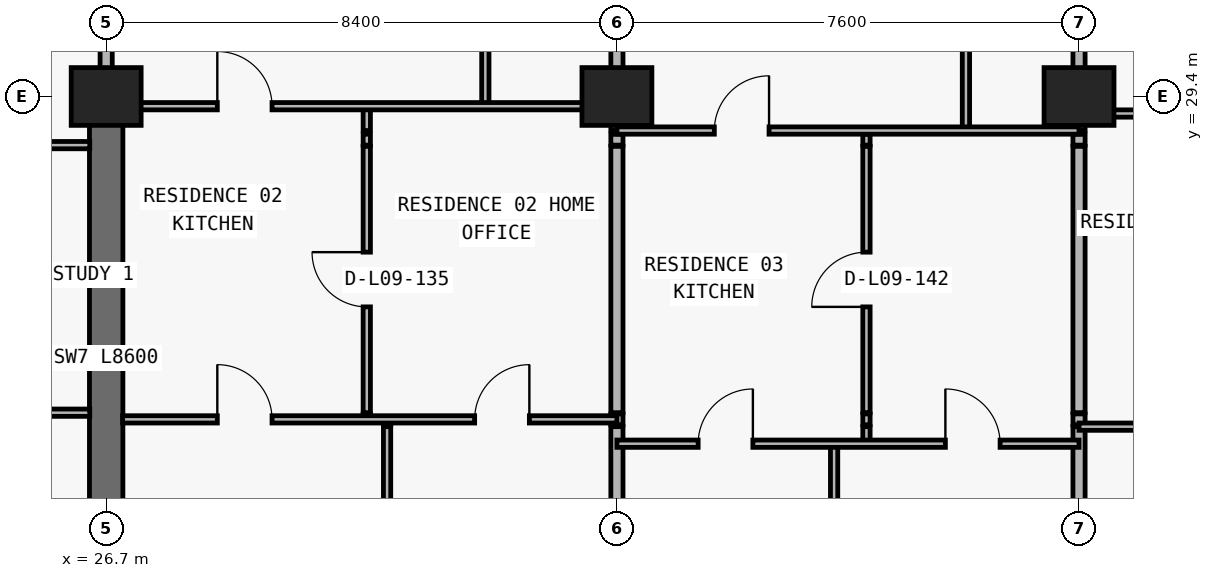
"""IFC4 building model, lengths in metres.
Left out: names, types, materials, properties, quantities, classifications, styles, units other than length and angle.
Written with IfcOpenShell. Run it as: python <this file> out.ifc"""

import sys

from ifc_helpers import new_model, si_unit, direction, frame, frame_2d, origin, origin_2d, place, context, subcontext, project, spatial, rectangle, extrude, element, fill, save


model = new_model("IFC4")
c1 = context("Model", 3, precision=1e-05, world=origin(), true_north=direction((0.0, 1.0)))
c2 = subcontext(c1, "Body", "Model", "MODEL_VIEW")
j1 = project(units=[si_unit("LENGTHUNIT", "METRE"), si_unit("PLANEANGLEUNIT", "RADIAN")], contexts=[c1])
p1 = place(None, origin())
s1 = spatial("IfcSite", under=j1, at=p1, CompositionType="ELEMENT")
p2 = place(p1, origin())
s2 = spatial("IfcBuilding", under=s1, at=p2, CompositionType="ELEMENT")
p3 = place(p2, frame((0.0, 0.0, 39.9)))
s3 = spatial("IfcBuildingStorey", under=s2, at=p3, CompositionType="ELEMENT", Elevation=39.9)
for number, where, z_axis, x_axis in (
    (1, (26.7, 29.4, 0.0), (0.0, 0.0, 1.0), (1.0, 0.0, 0.0)),
    (2, (35.1, 29.4, 0.0), (0.0, 0.0, 1.0), (1.0, 0.0, 0.0)),
    (3, (42.7, 29.4, 0.0), (0.0, 0.0, 1.0), (1.0, 0.0, 0.0)),
):
    element("IfcColumn", number, at=place(p3, frame(where, z_axis=z_axis, x_axis=x_axis)), inside=s3, PredefinedType="COLUMN", context=c2, shape_type="SweptSolid", body=[
        extrude(rectangle(XDim=1.15, YDim=0.95, at=origin_2d()), origin(), (0.0, 0.0, 1.0), 3.05),
    ])
p4 = place(p3, frame((26.7, 20.8, 0.0), z_axis=(0.0, 0.0, 1.0), x_axis=(0.0, 1.0, 0.0)))
e4 = element("IfcWall", 4, at=p4, inside=s3, PredefinedType="SHEAR", context=c2, shape_type="SweptSolid", body=[
    extrude(rectangle(XDim=8.6, YDim=0.55, at=frame_2d((4.3, 0.0))), origin(), (0.0, 0.0, 1.0), 3.05),
])
p5 = place(p3, frame((26.7, 29.405, 0.0), z_axis=(0.0, 0.0, 1.0), x_axis=(0.0, 1.0, 0.0)))
e5 = element("IfcWall", 5, at=p5, inside=s3, PredefinedType="PARTITIONING", context=c2, shape_type="SweptSolid", body=[
    extrude(rectangle(XDim=4.595, YDim=0.2, at=frame_2d((2.297, 0.0))), origin(), (0.0, 0.0, 1.0), 2.335),
])
p6 = place(p3, frame((30.986, 24.09, 0.0), z_axis=(0.0, 0.0, 1.0), x_axis=(0.0, 1.0, 0.0)))
e6 = element("IfcWall", 6, at=p6, inside=s3, PredefinedType="PARTITIONING", context=c2, shape_type="SweptSolid", body=[
    extrude(rectangle(XDim=0.09, YDim=0.12, at=frame_2d((0.045, 0.0))), origin(), (0.0, 0.0, 1.0), 2.423),
])
p7 = place(p3, frame((30.986, 24.2, 0.0), z_axis=(0.0, 0.0, 1.0), x_axis=(0.0, 1.0, 0.0)))
e7 = element("IfcWall", 7, at=p7, inside=s3, PredefinedType="PARTITIONING", context=c2, shape_type="SweptSolid", body=[
    extrude(rectangle(XDim=4.38, YDim=0.12, at=frame_2d((2.19, 0.0))), origin(), (0.0, 0.0, 1.0), 2.423),
])
p8 = place(p7, frame((1.74, 0.0, 0.0)))
e8 = element("IfcOpeningElement", 8, at=p8, cuts=e7, PredefinedType="OPENING", context=c2, shape_type="SweptSolid", body=[
    extrude(rectangle(XDim=0.9, YDim=2.15, at=frame_2d((0.45, 1.075))), frame((0.0, 0.07, 0.0), z_axis=(0.0, -1.0, 0.0), x_axis=(1.0, 0.0, 0.0)), (0.0, 0.0, 1.0), 0.14),
])
p9 = place(p3, frame((30.986, 28.6, 0.0), z_axis=(0.0, 0.0, 1.0), x_axis=(0.0, 1.0, 0.0)))
e9 = element("IfcWall", 9, at=p9, inside=s3, PredefinedType="PARTITIONING", context=c2, shape_type="SweptSolid", body=[
    extrude(rectangle(XDim=0.18, YDim=0.12, at=frame_2d((0.09, 0.0))), origin(), (0.0, 0.0, 1.0), 2.423),
])
p10 = place(p3, frame((30.986, 28.84, 0.0), z_axis=(0.0, 0.0, 1.0), x_axis=(0.0, 1.0, 0.0)))
e10 = element("IfcWall", 10, at=p10, inside=s3, PredefinedType="PARTITIONING", context=c2, shape_type="SweptSolid", body=[
    extrude(rectangle(XDim=0.4, YDim=0.12, at=frame_2d((0.2, 0.0))), origin(), (0.0, 0.0, 1.0), 2.423),
])
p11 = place(p3, frame((31.32, 6.24, 0.0), z_axis=(0.0, 0.0, 1.0), x_axis=(0.0, 1.0, 0.0)))
e11 = element("IfcWall", 11, at=p11, inside=s3, PredefinedType="PARTITIONING", context=c2, shape_type="SweptSolid", body=[
    extrude(rectangle(XDim=17.73, YDim=0.12, at=frame_2d((8.865, 0.0))), origin(), (0.0, 0.0, 1.0), 3.05),
])
p12 = place(p3, frame((31.32, 24.0, 0.0), z_axis=(0.0, 0.0, 1.0), x_axis=(0.0, 1.0, 0.0)))
e12 = element("IfcWall", 12, at=p12, inside=s3, PredefinedType="PARTITIONING", context=c2, shape_type="SweptSolid", body=[
    extrude(rectangle(XDim=0.09, YDim=0.12, at=frame_2d((0.045, 0.0))), origin(), (0.0, 0.0, 1.0), 3.05),
])
p13 = place(p3, frame((32.936, 29.24, 0.0), z_axis=(0.0, 0.0, 1.0), x_axis=(0.0, 1.0, 0.0)))
e13 = element("IfcWall", 13, at=p13, inside=s3, PredefinedType="PARTITIONING", context=c2, shape_type="SweptSolid", body=[
    extrude(rectangle(XDim=4.76, YDim=0.12, at=frame_2d((2.38, 0.0))), origin(), (0.0, 0.0, 1.0), 3.05),
])
p14 = place(p13, frame((1.955, 0.0, 0.0)))
e14 = element("IfcOpeningElement", 14, at=p14, cuts=e13, PredefinedType="OPENING", context=c2, shape_type="SweptSolid", body=[
    extrude(rectangle(XDim=0.85, YDim=2.1, at=frame_2d((0.425, 1.05))), frame((0.0, 0.07, 0.0), z_axis=(0.0, -1.0, 0.0), x_axis=(1.0, 0.0, 0.0)), (0.0, 0.0, 1.0), 0.14),
])
p15 = place(p3, frame((35.1, 6.24, 0.0), z_axis=(0.0, 0.0, 1.0), x_axis=(0.0, 1.0, 0.0)))
e15 = element("IfcWall", 15, at=p15, inside=s3, PredefinedType="PARTITIONING", context=c2, shape_type="SweptSolid", body=[
    extrude(rectangle(XDim=17.73, YDim=0.2, at=frame_2d((8.865, 0.0))), origin(), (0.0, 0.0, 1.0), 2.11),
])
p16 = place(p3, frame((35.1, 24.0, 0.0), z_axis=(0.0, 0.0, 1.0), x_axis=(0.0, 1.0, 0.0)))
e16 = element("IfcWall", 16, at=p16, inside=s3, PredefinedType="PARTITIONING", context=c2, shape_type="SweptSolid", body=[
    extrude(rectangle(XDim=0.18, YDim=0.2, at=frame_2d((0.09, 0.0))), origin(), (0.0, 0.0, 1.0), 2.11),
])
p17 = place(p3, frame((35.1, 24.2, 0.0), z_axis=(0.0, 0.0, 1.0), x_axis=(0.0, 1.0, 0.0)))
e17 = element("IfcWall", 17, at=p17, inside=s3, PredefinedType="PARTITIONING", context=c2, shape_type="SweptSolid", body=[
    extrude(rectangle(XDim=4.38, YDim=0.2, at=frame_2d((2.19, 0.0))), origin(), (0.0, 0.0, 1.0), 2.11),
])
p18 = place(p3, frame((35.1, 28.6, 0.0), z_axis=(0.0, 0.0, 1.0), x_axis=(0.0, 1.0, 0.0)))
e18 = element("IfcWall", 18, at=p18, inside=s3, PredefinedType="PARTITIONING", context=c2, shape_type="SweptSolid", body=[
    extrude(rectangle(XDim=0.18, YDim=0.2, at=frame_2d((0.09, 0.0))), origin(), (0.0, 0.0, 1.0), 2.11),
])
p19 = place(p3, frame((35.1, 28.84, 0.0), z_axis=(0.0, 0.0, 1.0), x_axis=(0.0, 1.0, 0.0)))
e19 = element("IfcWall", 19, at=p19, inside=s3, PredefinedType="PARTITIONING", context=c2, shape_type="SweptSolid", body=[
    extrude(rectangle(XDim=5.16, YDim=0.2, at=frame_2d((2.58, 0.0))), origin(), (0.0, 0.0, 1.0), 2.11),
])
p20 = place(p3, frame((38.672, 6.24, 0.0), z_axis=(0.0, 0.0, 1.0), x_axis=(0.0, 1.0, 0.0)))
e20 = element("IfcWall", 20, at=p20, inside=s3, PredefinedType="PARTITIONING", context=c2, shape_type="SweptSolid", body=[
    extrude(rectangle(XDim=17.45, YDim=0.12, at=frame_2d((8.725, 0.0))), origin(), (0.0, 0.0, 1.0), 2.423),
])
p21 = place(p3, frame((39.204, 23.69, 0.0), z_axis=(0.0, 0.0, 1.0), x_axis=(0.0, 1.0, 0.0)))
e21 = element("IfcWall", 21, at=p21, inside=s3, PredefinedType="PARTITIONING", context=c2, shape_type="SweptSolid", body=[
    extrude(rectangle(XDim=0.28, YDim=0.12, at=frame_2d((0.14, 0.0))), origin(), (0.0, 0.0, 1.0), 3.05),
])
p22 = place(p3, frame((39.204, 24.0, 0.0), z_axis=(0.0, 0.0, 1.0), x_axis=(0.0, 1.0, 0.0)))
e22 = element("IfcWall", 22, at=p22, inside=s3, PredefinedType="PARTITIONING", context=c2, shape_type="SweptSolid", body=[
    extrude(rectangle(XDim=0.18, YDim=0.12, at=frame_2d((0.09, 0.0))), origin(), (0.0, 0.0, 1.0), 3.05),
])
p23 = place(p3, frame((39.204, 24.2, 0.0), z_axis=(0.0, 0.0, 1.0), x_axis=(0.0, 1.0, 0.0)))
e23 = element("IfcWall", 23, at=p23, inside=s3, PredefinedType="PARTITIONING", context=c2, shape_type="SweptSolid", body=[
    extrude(rectangle(XDim=4.38, YDim=0.12, at=frame_2d((2.19, 0.0))), origin(), (0.0, 0.0, 1.0), 3.05),
])
p24 = place(p23, frame((1.74, 0.0, 0.0)))
e24 = element("IfcOpeningElement", 24, at=p24, cuts=e23, PredefinedType="OPENING", context=c2, shape_type="SweptSolid", body=[
    extrude(rectangle(XDim=0.9, YDim=2.15, at=frame_2d((0.45, 1.075))), frame((0.0, 0.07, 0.0), z_axis=(0.0, -1.0, 0.0), x_axis=(1.0, 0.0, 0.0)), (0.0, 0.0, 1.0), 0.14),
])
p25 = place(p3, frame((39.204, 28.6, 0.0), z_axis=(0.0, 0.0, 1.0), x_axis=(0.0, 1.0, 0.0)))
e25 = element("IfcWall", 25, at=p25, inside=s3, PredefinedType="PARTITIONING", context=c2, shape_type="SweptSolid", body=[
    extrude(rectangle(XDim=0.18, YDim=0.12, at=frame_2d((0.09, 0.0))), origin(), (0.0, 0.0, 1.0), 3.05),
])
p26 = place(p3, frame((40.84, 28.84, 0.0), z_axis=(0.0, 0.0, 1.0), x_axis=(0.0, 1.0, 0.0)))
e26 = element("IfcWall", 26, at=p26, inside=s3, PredefinedType="PARTITIONING", context=c2, shape_type="SweptSolid", body=[
    extrude(rectangle(XDim=5.16, YDim=0.12, at=frame_2d((2.58, 0.0))), origin(), (0.0, 0.0, 1.0), 2.578),
])
p27 = place(p26, frame((2.155, 0.0, 0.0)))
e27 = element("IfcOpeningElement", 27, at=p27, cuts=e26, PredefinedType="OPENING", context=c2, shape_type="SweptSolid", body=[
    extrude(rectangle(XDim=0.85, YDim=2.1, at=frame_2d((0.425, 1.05))), frame((0.0, 0.07, 0.0), z_axis=(0.0, -1.0, 0.0), x_axis=(1.0, 0.0, 0.0)), (0.0, 0.0, 1.0), 0.14),
])
p28 = place(p3, frame((42.7, 6.24, 0.0), z_axis=(0.0, 0.0, 1.0), x_axis=(0.0, 1.0, 0.0)))
e28 = element("IfcWall", 28, at=p28, inside=s3, PredefinedType="PARTITIONING", context=c2, shape_type="SweptSolid", body=[
    extrude(rectangle(XDim=17.73, YDim=0.2, at=frame_2d((8.865, 0.0))), origin(), (0.0, 0.0, 1.0), 2.11),
])
p29 = place(p3, frame((42.7, 24.0, 0.0), z_axis=(0.0, 0.0, 1.0), x_axis=(0.0, 1.0, 0.0)))
e29 = element("IfcWall", 29, at=p29, inside=s3, PredefinedType="PARTITIONING", context=c2, shape_type="SweptSolid", body=[
    extrude(rectangle(XDim=0.18, YDim=0.2, at=frame_2d((0.09, 0.0))), origin(), (0.0, 0.0, 1.0), 2.11),
])
p30 = place(p3, frame((42.7, 24.2, 0.0), z_axis=(0.0, 0.0, 1.0), x_axis=(0.0, 1.0, 0.0)))
e30 = element("IfcWall", 30, at=p30, inside=s3, PredefinedType="PARTITIONING", context=c2, shape_type="SweptSolid", body=[
    extrude(rectangle(XDim=4.38, YDim=0.2, at=frame_2d((2.19, 0.0))), origin(), (0.0, 0.0, 1.0), 2.11),
])
p31 = place(p3, frame((42.7, 28.6, 0.0), z_axis=(0.0, 0.0, 1.0), x_axis=(0.0, 1.0, 0.0)))
e31 = element("IfcWall", 31, at=p31, inside=s3, PredefinedType="PARTITIONING", context=c2, shape_type="SweptSolid", body=[
    extrude(rectangle(XDim=0.18, YDim=0.2, at=frame_2d((0.09, 0.0))), origin(), (0.0, 0.0, 1.0), 2.11),
])
p32 = place(p3, frame((42.7, 28.84, 0.0), z_axis=(0.0, 0.0, 1.0), x_axis=(0.0, 1.0, 0.0)))
e32 = element("IfcWall", 32, at=p32, inside=s3, PredefinedType="PARTITIONING", context=c2, shape_type="SweptSolid", body=[
    extrude(rectangle(XDim=5.16, YDim=0.2, at=frame_2d((2.58, 0.0))), origin(), (0.0, 0.0, 1.0), 2.11),
])
p33 = place(p3, frame((35.1, 23.69, 0.0), z_axis=(0.0, 0.0, 1.0), x_axis=(1.0, 0.0, 0.0)))
e33 = element("IfcWall", 33, at=p33, inside=s3, PredefinedType="PARTITIONING", context=c2, shape_type="SweptSolid", body=[
    extrude(rectangle(XDim=7.6, YDim=0.12, at=frame_2d((3.8, 0.0))), origin(), (0.0, 0.0, 1.0), 3.05),
])
p34 = place(p33, frame((1.336, 0.0, 0.0)))
e34 = element("IfcOpeningElement", 34, at=p34, cuts=e33, PredefinedType="OPENING", context=c2, shape_type="SweptSolid", body=[
    extrude(rectangle(XDim=0.9, YDim=2.15, at=frame_2d((0.45, 1.075))), frame((0.0, 0.07, 0.0), z_axis=(0.0, -1.0, 0.0), x_axis=(1.0, 0.0, 0.0)), (0.0, 0.0, 1.0), 0.14),
])
p35 = place(p33, frame((5.402, 0.0, 0.0)))
e35 = element("IfcOpeningElement", 35, at=p35, cuts=e33, PredefinedType="OPENING", context=c2, shape_type="SweptSolid", body=[
    extrude(rectangle(XDim=0.9, YDim=2.15, at=frame_2d((0.45, 1.075))), frame((0.0, 0.07, 0.0), z_axis=(0.0, -1.0, 0.0), x_axis=(1.0, 0.0, 0.0)), (0.0, 0.0, 1.0), 0.14),
])
p36 = place(p3, frame((42.7, 23.97, 0.0), z_axis=(0.0, 0.0, 1.0), x_axis=(1.0, 0.0, 0.0)))
e36 = element("IfcWall", 36, at=p36, inside=s3, PredefinedType="PARTITIONING", context=c2, shape_type="SweptSolid", body=[
    extrude(rectangle(XDim=8.13, YDim=0.12, at=frame_2d((4.065, 0.0))), origin(), (0.0, 0.0, 1.0), 3.05),
])
p37 = place(p36, frame((1.86, 0.0, 0.0)))
e37 = element("IfcOpeningElement", 37, at=p37, cuts=e36, PredefinedType="OPENING", context=c2, shape_type="SweptSolid", body=[
    extrude(rectangle(XDim=0.9, YDim=2.15, at=frame_2d((0.45, 1.075))), frame((0.0, 0.07, 0.0), z_axis=(0.0, -1.0, 0.0), x_axis=(1.0, 0.0, 0.0)), (0.0, 0.0, 1.0), 0.14),
])
p38 = place(p36, frame((6.008, 0.0, 0.0)))
e38 = element("IfcOpeningElement", 38, at=p38, cuts=e36, PredefinedType="OPENING", context=c2, shape_type="SweptSolid", body=[
    extrude(rectangle(XDim=0.9, YDim=2.15, at=frame_2d((0.45, 1.075))), frame((0.0, 0.07, 0.0), z_axis=(0.0, -1.0, 0.0), x_axis=(1.0, 0.0, 0.0)), (0.0, 0.0, 1.0), 0.14),
])
p39 = place(p3, frame((26.97, 24.09, 0.0), z_axis=(0.0, 0.0, 1.0), x_axis=(1.0, 0.0, 0.0)))
e39 = element("IfcWall", 39, at=p39, inside=s3, PredefinedType="PARTITIONING", context=c2, shape_type="SweptSolid", body=[
    extrude(rectangle(XDim=8.13, YDim=0.12, at=frame_2d((4.065, 0.0))), origin(), (0.0, 0.0, 1.0), 3.05),
])
p40 = place(p39, frame((1.558, 0.0, 0.0)))
e40 = element("IfcOpeningElement", 40, at=p40, cuts=e39, PredefinedType="OPENING", context=c2, shape_type="SweptSolid", body=[
    extrude(rectangle(XDim=0.9, YDim=2.15, at=frame_2d((0.45, 1.075))), frame((0.0, 0.07, 0.0), z_axis=(0.0, -1.0, 0.0), x_axis=(1.0, 0.0, 0.0)), (0.0, 0.0, 1.0), 0.14),
])
p41 = place(p39, frame((5.79, 0.0, 0.0)))
e41 = element("IfcOpeningElement", 41, at=p41, cuts=e39, PredefinedType="OPENING", context=c2, shape_type="SweptSolid", body=[
    extrude(rectangle(XDim=0.9, YDim=2.15, at=frame_2d((0.45, 1.075))), frame((0.0, 0.07, 0.0), z_axis=(0.0, -1.0, 0.0), x_axis=(1.0, 0.0, 0.0)), (0.0, 0.0, 1.0), 0.14),
])
p42 = place(p3, frame((18.305, 24.2, 0.0), z_axis=(0.0, 0.0, 1.0), x_axis=(1.0, 0.0, 0.0)))
e42 = element("IfcWall", 42, at=p42, inside=s3, PredefinedType="PARTITIONING", context=c2, shape_type="SweptSolid", body=[
    extrude(rectangle(XDim=8.125, YDim=0.12, at=frame_2d((4.062, 0.0))), origin(), (0.0, 0.0, 1.0), 3.05),
])
p43 = place(p42, frame((3.613, 0.0, 0.0)))
e43 = element("IfcOpeningElement", 43, at=p43, cuts=e42, PredefinedType="OPENING", context=c2, shape_type="SweptSolid", body=[
    extrude(rectangle(XDim=0.9, YDim=2.15, at=frame_2d((0.45, 1.075))), frame((0.0, 0.07, 0.0), z_axis=(0.0, -1.0, 0.0), x_axis=(1.0, 0.0, 0.0)), (0.0, 0.0, 1.0), 0.14),
])
p44 = place(p3, frame((18.3, 28.6, 0.0), z_axis=(0.0, 0.0, 1.0), x_axis=(1.0, 0.0, 0.0)))
e44 = element("IfcWall", 44, at=p44, inside=s3, PredefinedType="PARTITIONING", context=c2, shape_type="SweptSolid", body=[
    extrude(rectangle(XDim=8.13, YDim=0.12, at=frame_2d((4.065, 0.0))), origin(), (0.0, 0.0, 1.0), 3.05),
])
p45 = place(p44, frame((2.861, 0.0, 0.0)))
e45 = element("IfcOpeningElement", 45, at=p45, cuts=e44, PredefinedType="OPENING", context=c2, shape_type="SweptSolid", body=[
    extrude(rectangle(XDim=0.9, YDim=2.15, at=frame_2d((0.45, 1.075))), frame((0.0, 0.07, 0.0), z_axis=(0.0, -1.0, 0.0), x_axis=(1.0, 0.0, 0.0)), (0.0, 0.0, 1.0), 0.14),
])
p46 = place(p3, frame((35.1, 28.84, 0.0), z_axis=(0.0, 0.0, 1.0), x_axis=(1.0, 0.0, 0.0)))
e46 = element("IfcWall", 46, at=p46, inside=s3, PredefinedType="PARTITIONING", context=c2, shape_type="SweptSolid", body=[
    extrude(rectangle(XDim=7.6, YDim=0.12, at=frame_2d((3.8, 0.0))), origin(), (0.0, 0.0, 1.0), 3.05),
])
p47 = place(p46, frame((1.602, 0.0, 0.0)))
e47 = element("IfcOpeningElement", 47, at=p47, cuts=e46, PredefinedType="OPENING", context=c2, shape_type="SweptSolid", body=[
    extrude(rectangle(XDim=0.9, YDim=2.15, at=frame_2d((0.45, 1.075))), frame((0.0, 0.07, 0.0), z_axis=(0.0, -1.0, 0.0), x_axis=(1.0, 0.0, 0.0)), (0.0, 0.0, 1.0), 0.14),
])
p48 = place(p3, frame((42.7, 29.12, 0.0), z_axis=(0.0, 0.0, 1.0), x_axis=(1.0, 0.0, 0.0)))
e48 = element("IfcWall", 48, at=p48, inside=s3, PredefinedType="PARTITIONING", context=c2, shape_type="SweptSolid", body=[
    extrude(rectangle(XDim=8.13, YDim=0.12, at=frame_2d((4.065, 0.0))), origin(), (0.0, 0.0, 1.0), 2.11),
])
p49 = place(p48, frame((1.943, 0.0, 0.0)))
e49 = element("IfcOpeningElement", 49, at=p49, cuts=e48, PredefinedType="OPENING", context=c2, shape_type="SweptSolid", body=[
    extrude(rectangle(XDim=0.9, YDim=2.06, at=frame_2d((0.45, 1.03))), frame((0.0, 0.07, 0.0), z_axis=(0.0, -1.0, 0.0), x_axis=(1.0, 0.0, 0.0)), (0.0, 0.0, 1.0), 0.14),
])
p50 = place(p3, frame((26.97, 29.24, 0.0), z_axis=(0.0, 0.0, 1.0), x_axis=(1.0, 0.0, 0.0)))
e50 = element("IfcWall", 50, at=p50, inside=s3, PredefinedType="PARTITIONING", context=c2, shape_type="SweptSolid", body=[
    extrude(rectangle(XDim=8.13, YDim=0.12, at=frame_2d((4.065, 0.0))), origin(), (0.0, 0.0, 1.0), 2.11),
])
p51 = place(p50, frame((1.558, 0.0, 0.0)))
e51 = element("IfcOpeningElement", 51, at=p51, cuts=e50, PredefinedType="OPENING", context=c2, shape_type="SweptSolid", body=[
    extrude(rectangle(XDim=0.9, YDim=2.06, at=frame_2d((0.45, 1.03))), frame((0.0, 0.07, 0.0), z_axis=(0.0, -1.0, 0.0), x_axis=(1.0, 0.0, 0.0)), (0.0, 0.0, 1.0), 0.14),
])
p52 = place(p51, origin())
e52 = element("IfcDoor", 52, at=p52, inside=s3, OperationType="SINGLE_SWING_LEFT", PredefinedType="DOOR", context=c2, shape_type="SweptSolid", body=[
    extrude(rectangle(XDim=0.9, YDim=2.06, at=frame_2d((0.45, 1.03))), frame((0.0, 0.025, 0.0), z_axis=(0.0, -1.0, 0.0), x_axis=(1.0, 0.0, 0.0)), (0.0, 0.0, 1.0), 0.05),
])
fill(e51, e52)
p53 = place(p8, origin())
e53 = element("IfcDoor", 53, at=p53, inside=s3, OperationType="SINGLE_SWING_RIGHT", PredefinedType="DOOR", context=c2, shape_type="SweptSolid", body=[
    extrude(rectangle(XDim=0.9, YDim=2.15, at=frame_2d((0.45, 1.075))), frame((0.0, 0.025, 0.0), z_axis=(0.0, -1.0, 0.0), x_axis=(1.0, 0.0, 0.0)), (0.0, 0.0, 1.0), 0.05),
])
fill(e8, e53)
p54 = place(p40, origin())
e54 = element("IfcDoor", 54, at=p54, inside=s3, OperationType="SINGLE_SWING_LEFT", PredefinedType="DOOR", context=c2, shape_type="SweptSolid", body=[
    extrude(rectangle(XDim=0.9, YDim=2.15, at=frame_2d((0.45, 1.075))), frame((0.0, 0.025, 0.0), z_axis=(0.0, -1.0, 0.0), x_axis=(1.0, 0.0, 0.0)), (0.0, 0.0, 1.0), 0.05),
])
fill(e40, e54)
p55 = place(p41, origin())
e55 = element("IfcDoor", 55, at=p55, inside=s3, OperationType="SINGLE_SWING_RIGHT", PredefinedType="DOOR", context=c2, shape_type="SweptSolid", body=[
    extrude(rectangle(XDim=0.9, YDim=2.15, at=frame_2d((0.45, 1.075))), frame((0.0, 0.025, 0.0), z_axis=(0.0, -1.0, 0.0), x_axis=(1.0, 0.0, 0.0)), (0.0, 0.0, 1.0), 0.05),
])
fill(e41, e55)
p56 = place(p47, origin())
e56 = element("IfcDoor", 56, at=p56, inside=s3, OperationType="SINGLE_SWING_RIGHT", PredefinedType="DOOR", context=c2, shape_type="SweptSolid", body=[
    extrude(rectangle(XDim=0.9, YDim=2.15, at=frame_2d((0.45, 1.075))), frame((0.0, 0.025, 0.0), z_axis=(0.0, -1.0, 0.0), x_axis=(1.0, 0.0, 0.0)), (0.0, 0.0, 1.0), 0.05),
])
fill(e47, e56)
p57 = place(p24, origin())
e57 = element("IfcDoor", 57, at=p57, inside=s3, OperationType="SINGLE_SWING_LEFT", PredefinedType="DOOR", context=c2, shape_type="SweptSolid", body=[
    extrude(rectangle(XDim=0.9, YDim=2.15, at=frame_2d((0.45, 1.075))), frame((0.0, 0.025, 0.0), z_axis=(0.0, -1.0, 0.0), x_axis=(1.0, 0.0, 0.0)), (0.0, 0.0, 1.0), 0.05),
])
fill(e24, e57)
p58 = place(p34, origin())
e58 = element("IfcDoor", 58, at=p58, inside=s3, OperationType="SINGLE_SWING_RIGHT", PredefinedType="DOOR", context=c2, shape_type="SweptSolid", body=[
    extrude(rectangle(XDim=0.9, YDim=2.15, at=frame_2d((0.45, 1.075))), frame((0.0, 0.025, 0.0), z_axis=(0.0, -1.0, 0.0), x_axis=(1.0, 0.0, 0.0)), (0.0, 0.0, 1.0), 0.05),
])
fill(e34, e58)
p59 = place(p35, origin())
e59 = element("IfcDoor", 59, at=p59, inside=s3, OperationType="SINGLE_SWING_LEFT", PredefinedType="DOOR", context=c2, shape_type="SweptSolid", body=[
    extrude(rectangle(XDim=0.9, YDim=2.15, at=frame_2d((0.45, 1.075))), frame((0.0, 0.025, 0.0), z_axis=(0.0, -1.0, 0.0), x_axis=(1.0, 0.0, 0.0)), (0.0, 0.0, 1.0), 0.05),
])
fill(e35, e59)
save(model, sys.argv[1])
